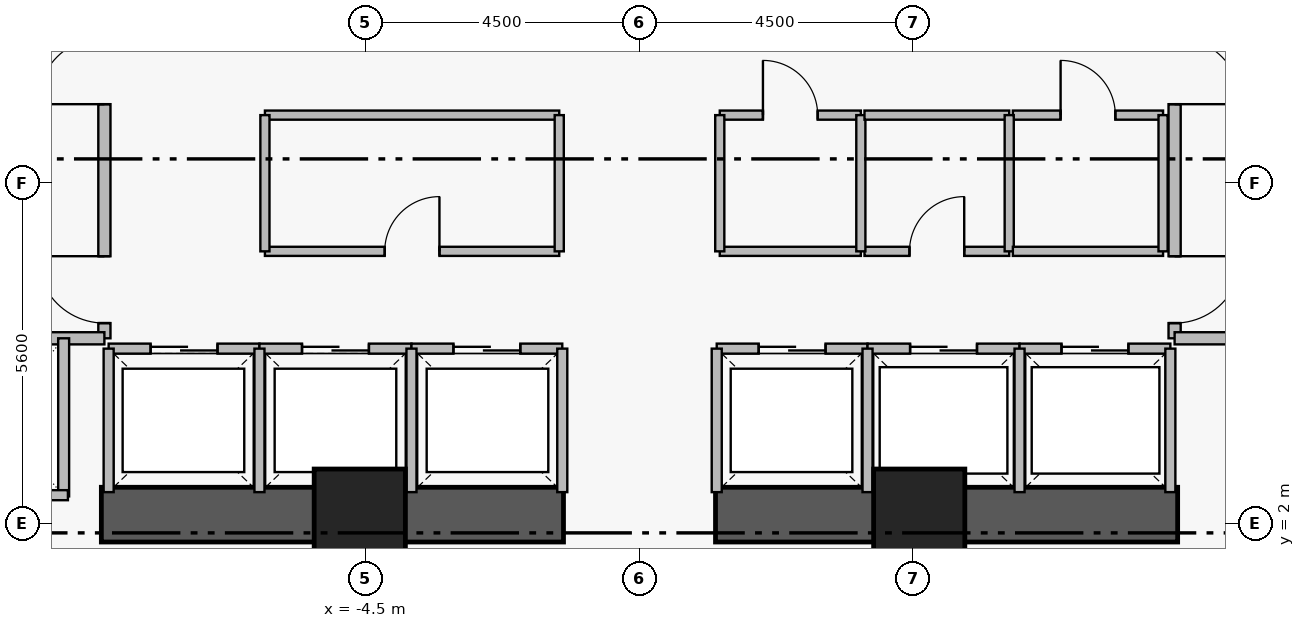
"""IFC4 building model, lengths in metres.
Left out: names, types, materials, properties, quantities, classifications, styles, units other than length and angle.
Written with IfcOpenShell. Run it as: python <this file> out.ifc"""

import sys

from ifc_helpers import new_model, si_unit, direction, frame, frame_2d, origin, origin_2d, place, context, subcontext, project, spatial, rectangle, extrude, element, fill, save


model = new_model("IFC4")
c1 = context("Model", 3, precision=1e-05, world=origin(), true_north=direction((0.0, 1.0)))
c2 = subcontext(c1, "Body", "Model", "MODEL_VIEW")
j1 = project(units=[si_unit("LENGTHUNIT", "METRE"), si_unit("PLANEANGLEUNIT", "RADIAN")], contexts=[c1])
p1 = place(None, origin())
s1 = spatial("IfcSite", under=j1, at=p1, CompositionType="ELEMENT")
p2 = place(p1, origin())
s2 = spatial("IfcBuilding", under=s1, at=p2, CompositionType="ELEMENT")
p3 = place(p2, origin())
s3 = spatial("IfcBuildingStorey", under=s2, at=p3, CompositionType="ELEMENT", Elevation=0.0)
for number, where, z_axis, x_axis in (
    (1, (-8.85, 2.15, 0.0), (0.0, 0.0, 1.0), (1.0, 0.0, 0.0)),
    (2, (1.25, 2.15, 0.0), (0.0, 0.0, 1.0), (1.0, 0.0, 0.0)),
):
    element("IfcWall", number, at=place(p3, frame(where, z_axis=z_axis, x_axis=x_axis)), inside=s3, PredefinedType="SHEAR", context=c2, shape_type="SweptSolid", body=[
        extrude(rectangle(XDim=7.6, YDim=0.9, at=frame_2d((3.8, 0.0))), origin(), (0.0, 0.0, 1.0), 5.75),
    ])
for number, where, z_axis, x_axis in (
    (3, (-4.6, 2.15, 0.0), (0.0, 0.0, 1.0), (1.0, 0.0, 0.0)),
    (4, (4.6, 2.15, 0.0), (0.0, 0.0, 1.0), (1.0, 0.0, 0.0)),
):
    element("IfcColumn", number, at=place(p3, frame(where, z_axis=z_axis, x_axis=x_axis)), inside=s3, PredefinedType="COLUMN", context=c2, shape_type="SweptSolid", body=[
        extrude(rectangle(XDim=1.5, YDim=1.5, at=origin_2d()), origin(), (0.0, 0.0, 1.0), 6.0),
    ])
p4 = place(p3, frame((-8.8, 5.05, 0.0), z_axis=(0.0, 0.0, 1.0), x_axis=(0.0, 1.0, 0.0)))
e5 = element("IfcWall", 5, at=p4, inside=s3, PredefinedType="PARTITIONING", context=c2, shape_type="SweptSolid", body=[
    extrude(rectangle(XDim=6.1, YDim=0.2, at=frame_2d((3.05, 0.0))), origin(), (0.0, 0.0, 1.0), 5.75),
])
p5 = place(p4, frame((0.25, 0.0, 0.0)))
e6 = element("IfcOpeningElement", 6, at=p5, cuts=e5, PredefinedType="OPENING", context=c2, shape_type="SweptSolid", body=[
    extrude(rectangle(XDim=1.1, YDim=2.2, at=frame_2d((0.55, 1.1))), frame((0.0, 0.11, 0.0), z_axis=(0.0, -1.0, 0.0), x_axis=(1.0, 0.0, 0.0)), (0.0, 0.0, 1.0), 0.22),
])
p6 = place(p4, frame((3.85, 0.0, 0.0)))
e7 = element("IfcOpeningElement", 7, at=p6, cuts=e5, PredefinedType="OPENING", context=c2, shape_type="SweptSolid", body=[
    extrude(rectangle(XDim=1.1, YDim=2.2, at=frame_2d((0.55, 1.1))), frame((0.0, 0.11, 0.0), z_axis=(0.0, -1.0, 0.0), x_axis=(1.0, 0.0, 0.0)), (0.0, 0.0, 1.0), 0.22),
])
p7 = place(p3, frame((8.8, 11.15, 0.0), z_axis=(0.0, 0.0, 1.0), x_axis=(0.0, -1.0, 0.0)))
e8 = element("IfcWall", 8, at=p7, inside=s3, PredefinedType="PARTITIONING", context=c2, shape_type="SweptSolid", body=[
    extrude(rectangle(XDim=6.1, YDim=0.2, at=frame_2d((3.05, 0.0))), origin(), (0.0, 0.0, 1.0), 5.75),
])
p8 = place(p7, frame((1.15, 0.0, 0.0)))
e9 = element("IfcOpeningElement", 9, at=p8, cuts=e8, PredefinedType="OPENING", context=c2, shape_type="SweptSolid", body=[
    extrude(rectangle(XDim=1.1, YDim=2.2, at=frame_2d((0.55, 1.1))), frame((0.0, 0.11, 0.0), z_axis=(0.0, -1.0, 0.0), x_axis=(1.0, 0.0, 0.0)), (0.0, 0.0, 1.0), 0.22),
])
p9 = place(p7, frame((4.75, 0.0, 0.0)))
e10 = element("IfcOpeningElement", 10, at=p9, cuts=e8, PredefinedType="OPENING", context=c2, shape_type="SweptSolid", body=[
    extrude(rectangle(XDim=1.1, YDim=2.2, at=frame_2d((0.55, 1.1))), frame((0.0, 0.11, 0.0), z_axis=(0.0, -1.0, 0.0), x_axis=(1.0, 0.0, 0.0)), (0.0, 0.0, 1.0), 0.22),
])
p10 = place(p3, frame((-8.73, 4.88, 0.0), z_axis=(0.0, 0.0, 1.0), x_axis=(1.0, 0.0, 0.0)))
e11 = element("IfcWall", 11, at=p10, inside=s3, PredefinedType="PARTITIONING", context=c2, shape_type="SweptSolid", body=[
    extrude(rectangle(XDim=2.48, YDim=0.165, at=frame_2d((1.24, 0.0))), origin(), (0.0, 0.0, 1.0), 5.75),
])
p11 = place(p10, frame((0.69, 0.0, 0.0)))
e12 = element("IfcOpeningElement", 12, at=p11, cuts=e11, PredefinedType="OPENING", context=c2, shape_type="SweptSolid", body=[
    extrude(rectangle(XDim=1.1, YDim=2.25, at=frame_2d((0.55, 1.125))), frame((0.0, 0.093, 0.0), z_axis=(0.0, -1.0, 0.0), x_axis=(1.0, 0.0, 0.0)), (0.0, 0.0, 1.0), 0.185),
])
p12 = place(p3, frame((-6.25, 4.88, 0.0), z_axis=(0.0, 0.0, 1.0), x_axis=(1.0, 0.0, 0.0)))
e13 = element("IfcWall", 13, at=p12, inside=s3, PredefinedType="PARTITIONING", context=c2, shape_type="SweptSolid", body=[
    extrude(rectangle(XDim=2.5, YDim=0.165, at=frame_2d((1.25, 0.0))), origin(), (0.0, 0.0, 1.0), 5.75),
])
p13 = place(p12, frame((0.7, 0.0, 0.0)))
e14 = element("IfcOpeningElement", 14, at=p13, cuts=e13, PredefinedType="OPENING", context=c2, shape_type="SweptSolid", body=[
    extrude(rectangle(XDim=1.1, YDim=2.25, at=frame_2d((0.55, 1.125))), frame((0.0, 0.093, 0.0), z_axis=(0.0, -1.0, 0.0), x_axis=(1.0, 0.0, 0.0)), (0.0, 0.0, 1.0), 0.185),
])
p14 = place(p3, frame((-3.75, 4.88, 0.0), z_axis=(0.0, 0.0, 1.0), x_axis=(1.0, 0.0, 0.0)))
e15 = element("IfcWall", 15, at=p14, inside=s3, PredefinedType="PARTITIONING", context=c2, shape_type="SweptSolid", body=[
    extrude(rectangle(XDim=2.48, YDim=0.165, at=frame_2d((1.24, 0.0))), origin(), (0.0, 0.0, 1.0), 5.75),
])
p15 = place(p14, frame((0.69, 0.0, 0.0)))
e16 = element("IfcOpeningElement", 16, at=p15, cuts=e15, PredefinedType="OPENING", context=c2, shape_type="SweptSolid", body=[
    extrude(rectangle(XDim=1.1, YDim=2.25, at=frame_2d((0.55, 1.125))), frame((0.0, 0.093, 0.0), z_axis=(0.0, -1.0, 0.0), x_axis=(1.0, 0.0, 0.0)), (0.0, 0.0, 1.0), 0.185),
])
p16 = place(p3, frame((1.27, 4.88, 0.0), z_axis=(0.0, 0.0, 1.0), x_axis=(1.0, 0.0, 0.0)))
e17 = element("IfcWall", 17, at=p16, inside=s3, PredefinedType="PARTITIONING", context=c2, shape_type="SweptSolid", body=[
    extrude(rectangle(XDim=2.48, YDim=0.165, at=frame_2d((1.24, 0.0))), origin(), (0.0, 0.0, 1.0), 5.75),
])
p17 = place(p16, frame((0.69, 0.0, 0.0)))
e18 = element("IfcOpeningElement", 18, at=p17, cuts=e17, PredefinedType="OPENING", context=c2, shape_type="SweptSolid", body=[
    extrude(rectangle(XDim=1.1, YDim=2.25, at=frame_2d((0.55, 1.125))), frame((0.0, 0.093, 0.0), z_axis=(0.0, -1.0, 0.0), x_axis=(1.0, 0.0, 0.0)), (0.0, 0.0, 1.0), 0.185),
])
p18 = place(p3, frame((3.75, 4.88, 0.0), z_axis=(0.0, 0.0, 1.0), x_axis=(1.0, 0.0, 0.0)))
e19 = element("IfcWall", 19, at=p18, inside=s3, PredefinedType="PARTITIONING", context=c2, shape_type="SweptSolid", body=[
    extrude(rectangle(XDim=2.5, YDim=0.165, at=frame_2d((1.25, 0.0))), origin(), (0.0, 0.0, 1.0), 5.75),
])
p19 = place(p18, frame((0.7, 0.0, 0.0)))
e20 = element("IfcOpeningElement", 20, at=p19, cuts=e19, PredefinedType="OPENING", context=c2, shape_type="SweptSolid", body=[
    extrude(rectangle(XDim=1.1, YDim=2.25, at=frame_2d((0.55, 1.125))), frame((0.0, 0.093, 0.0), z_axis=(0.0, -1.0, 0.0), x_axis=(1.0, 0.0, 0.0)), (0.0, 0.0, 1.0), 0.185),
])
p20 = place(p3, frame((6.25, 4.88, 0.0), z_axis=(0.0, 0.0, 1.0), x_axis=(1.0, 0.0, 0.0)))
e21 = element("IfcWall", 21, at=p20, inside=s3, PredefinedType="PARTITIONING", context=c2, shape_type="SweptSolid", body=[
    extrude(rectangle(XDim=2.48, YDim=0.165, at=frame_2d((1.24, 0.0))), origin(), (0.0, 0.0, 1.0), 5.75),
])
p21 = place(p20, frame((0.69, 0.0, 0.0)))
e22 = element("IfcOpeningElement", 22, at=p21, cuts=e21, PredefinedType="OPENING", context=c2, shape_type="SweptSolid", body=[
    extrude(rectangle(XDim=1.1, YDim=2.25, at=frame_2d((0.55, 1.125))), frame((0.0, 0.093, 0.0), z_axis=(0.0, -1.0, 0.0), x_axis=(1.0, 0.0, 0.0)), (0.0, 0.0, 1.0), 0.185),
])
p22 = place(p3, frame((-6.16, 6.48, 0.0), z_axis=(0.0, 0.0, 1.0), x_axis=(1.0, 0.0, 0.0)))
e23 = element("IfcWall", 23, at=p22, inside=s3, PredefinedType="PARTITIONING", context=c2, shape_type="SweptSolid", body=[
    extrude(rectangle(XDim=4.84, YDim=0.15, at=frame_2d((2.42, 0.0))), origin(), (0.0, 0.0, 1.0), 5.75),
])
p23 = place(p22, frame((1.97, 0.0, 0.0)))
e24 = element("IfcOpeningElement", 24, at=p23, cuts=e23, PredefinedType="OPENING", context=c2, shape_type="SweptSolid", body=[
    extrude(rectangle(XDim=0.9, YDim=2.15, at=frame_2d((0.45, 1.075))), frame((0.0, 0.085, 0.0), z_axis=(0.0, -1.0, 0.0), x_axis=(1.0, 0.0, 0.0)), (0.0, 0.0, 1.0), 0.17),
])
p24 = place(p3, frame((1.32, 8.72, 0.0), z_axis=(0.0, 0.0, 1.0), x_axis=(1.0, 0.0, 0.0)))
e25 = element("IfcWall", 25, at=p24, inside=s3, PredefinedType="PARTITIONING", context=c2, shape_type="SweptSolid", body=[
    extrude(rectangle(XDim=2.32, YDim=0.15, at=frame_2d((1.16, 0.0))), origin(), (0.0, 0.0, 1.0), 5.75),
])
p25 = place(p24, frame((0.71, 0.0, 0.0)))
e26 = element("IfcOpeningElement", 26, at=p25, cuts=e25, PredefinedType="OPENING", context=c2, shape_type="SweptSolid", body=[
    extrude(rectangle(XDim=0.9, YDim=2.15, at=frame_2d((0.45, 1.075))), frame((0.0, 0.085, 0.0), z_axis=(0.0, -1.0, 0.0), x_axis=(1.0, 0.0, 0.0)), (0.0, 0.0, 1.0), 0.17),
])
p26 = place(p3, frame((3.7, 6.48, 0.0), z_axis=(0.0, 0.0, 1.0), x_axis=(1.0, 0.0, 0.0)))
e27 = element("IfcWall", 27, at=p26, inside=s3, PredefinedType="PARTITIONING", context=c2, shape_type="SweptSolid", body=[
    extrude(rectangle(XDim=2.38, YDim=0.15, at=frame_2d((1.19, 0.0))), origin(), (0.0, 0.0, 1.0), 5.75),
])
p27 = place(p26, frame((0.74, 0.0, 0.0)))
e28 = element("IfcOpeningElement", 28, at=p27, cuts=e27, PredefinedType="OPENING", context=c2, shape_type="SweptSolid", body=[
    extrude(rectangle(XDim=0.9, YDim=2.15, at=frame_2d((0.45, 1.075))), frame((0.0, 0.085, 0.0), z_axis=(0.0, -1.0, 0.0), x_axis=(1.0, 0.0, 0.0)), (0.0, 0.0, 1.0), 0.17),
])
p28 = place(p3, frame((6.14, 8.72, 0.0), z_axis=(0.0, 0.0, 1.0), x_axis=(1.0, 0.0, 0.0)))
e29 = element("IfcWall", 29, at=p28, inside=s3, PredefinedType="PARTITIONING", context=c2, shape_type="SweptSolid", body=[
    extrude(rectangle(XDim=2.47, YDim=0.15, at=frame_2d((1.235, 0.0))), origin(), (0.0, 0.0, 1.0), 5.75),
])
p29 = place(p28, frame((0.785, 0.0, 0.0)))
e30 = element("IfcOpeningElement", 30, at=p29, cuts=e29, PredefinedType="OPENING", context=c2, shape_type="SweptSolid", body=[
    extrude(rectangle(XDim=0.9, YDim=2.15, at=frame_2d((0.45, 1.075))), frame((0.0, 0.085, 0.0), z_axis=(0.0, -1.0, 0.0), x_axis=(1.0, 0.0, 0.0)), (0.0, 0.0, 1.0), 0.17),
])
for number, where, z_axis, x_axis in (
    (31, (-11.65, 5.05, 0.0), (0.0, 0.0, 1.0), (1.0, 0.0, 0.0)),
    (32, (8.8, 5.05, 0.0), (0.0, 0.0, 1.0), (1.0, 0.0, 0.0)),
):
    element("IfcWall", number, at=place(p3, frame(where, z_axis=z_axis, x_axis=x_axis)), inside=s3, PredefinedType="PARTITIONING", context=c2, shape_type="SweptSolid", body=[
        extrude(rectangle(XDim=2.85, YDim=0.2, at=frame_2d((1.425, 0.0))), origin(), (0.0, 0.0, 1.0), 5.75),
    ])
for number, where, z_axis, x_axis in (
    (33, (-8.73, 2.52, 0.0), (0.0, 0.0, 1.0), (0.0, 1.0, 0.0)),
    (34, (-6.25, 2.52, 0.0), (0.0, 0.0, 1.0), (0.0, 1.0, 0.0)),
    (35, (-3.75, 2.52, 0.0), (0.0, 0.0, 1.0), (0.0, 1.0, 0.0)),
    (36, (-1.27, 2.52, 0.0), (0.0, 0.0, 1.0), (0.0, 1.0, 0.0)),
    (37, (1.27, 2.52, 0.0), (0.0, 0.0, 1.0), (0.0, 1.0, 0.0)),
    (38, (3.75, 2.52, 0.0), (0.0, 0.0, 1.0), (0.0, 1.0, 0.0)),
    (39, (6.25, 2.52, 0.0), (0.0, 0.0, 1.0), (0.0, 1.0, 0.0)),
    (40, (8.73, 2.52, 0.0), (0.0, 0.0, 1.0), (0.0, 1.0, 0.0)),
):
    element("IfcWall", number, at=place(p3, frame(where, z_axis=z_axis, x_axis=x_axis)), inside=s3, PredefinedType="PARTITIONING", context=c2, shape_type="SweptSolid", body=[
        extrude(rectangle(XDim=2.36, YDim=0.165, at=frame_2d((1.18, 0.0))), origin(), (0.0, 0.0, 1.0), 5.75),
    ])
p30 = place(p3, frame((-9.47, 2.45, 0.0), z_axis=(0.0, 0.0, 1.0), x_axis=(0.0, 1.0, 0.0)))
e41 = element("IfcWall", 41, at=p30, inside=s3, PredefinedType="PARTITIONING", context=c2, shape_type="SweptSolid", body=[
    extrude(rectangle(XDim=2.6, YDim=0.18, at=frame_2d((1.3, 0.0))), origin(), (0.0, 0.0, 1.0), 5.75),
])
p31 = place(p3, frame((-11.71, 2.47, 0.0), z_axis=(0.0, 0.0, 1.0), x_axis=(1.0, 0.0, 0.0)))
e42 = element("IfcWall", 42, at=p31, inside=s3, PredefinedType="PARTITIONING", context=c2, shape_type="SweptSolid", body=[
    extrude(rectangle(XDim=2.31, YDim=0.165, at=frame_2d((1.155, 0.0))), origin(), (0.0, 0.0, 1.0), 4.35),
])
p32 = place(p3, frame((-6.16, 8.72, 0.0), z_axis=(0.0, 0.0, 1.0), x_axis=(1.0, 0.0, 0.0)))
e43 = element("IfcWall", 43, at=p32, inside=s3, PredefinedType="PARTITIONING", context=c2, shape_type="SweptSolid", body=[
    extrude(rectangle(XDim=4.84, YDim=0.15, at=frame_2d((2.42, 0.0))), origin(), (0.0, 0.0, 1.0), 5.75),
])
for number, where, z_axis, x_axis in (
    (44, (-6.16, 6.48, 0.0), (0.0, 0.0, 1.0), (0.0, 1.0, 0.0)),
    (45, (-1.32, 6.48, 0.0), (0.0, 0.0, 1.0), (0.0, 1.0, 0.0)),
):
    element("IfcWall", number, at=place(p3, frame(where, z_axis=z_axis, x_axis=x_axis)), inside=s3, PredefinedType="PARTITIONING", context=c2, shape_type="SweptSolid", body=[
        extrude(rectangle(XDim=2.24, YDim=0.15, at=frame_2d((1.12, 0.0))), origin(), (0.0, 0.0, 1.0), 5.75),
    ])
p33 = place(p3, frame((1.32, 6.48, 0.0), z_axis=(0.0, 0.0, 1.0), x_axis=(1.0, 0.0, 0.0)))
e46 = element("IfcWall", 46, at=p33, inside=s3, PredefinedType="PARTITIONING", context=c2, shape_type="SweptSolid", body=[
    extrude(rectangle(XDim=2.32, YDim=0.15, at=frame_2d((1.16, 0.0))), origin(), (0.0, 0.0, 1.0), 5.75),
])
for number, where, z_axis, x_axis in (
    (47, (1.32, 6.48, 0.0), (0.0, 0.0, 1.0), (0.0, 1.0, 0.0)),
    (48, (3.64, 6.48, 0.0), (0.0, 0.0, 1.0), (0.0, 1.0, 0.0)),
):
    element("IfcWall", number, at=place(p3, frame(where, z_axis=z_axis, x_axis=x_axis)), inside=s3, PredefinedType="PARTITIONING", context=c2, shape_type="SweptSolid", body=[
        extrude(rectangle(XDim=2.24, YDim=0.15, at=frame_2d((1.12, 0.0))), origin(), (0.0, 0.0, 1.0), 5.75),
    ])
p34 = place(p3, frame((3.7, 8.72, 0.0), z_axis=(0.0, 0.0, 1.0), x_axis=(1.0, 0.0, 0.0)))
e49 = element("IfcWall", 49, at=p34, inside=s3, PredefinedType="PARTITIONING", context=c2, shape_type="SweptSolid", body=[
    extrude(rectangle(XDim=2.38, YDim=0.15, at=frame_2d((1.19, 0.0))), origin(), (0.0, 0.0, 1.0), 5.75),
])
p35 = place(p3, frame((6.08, 6.48, 0.0), z_axis=(0.0, 0.0, 1.0), x_axis=(0.0, 1.0, 0.0)))
e50 = element("IfcWall", 50, at=p35, inside=s3, PredefinedType="PARTITIONING", context=c2, shape_type="SweptSolid", body=[
    extrude(rectangle(XDim=2.24, YDim=0.15, at=frame_2d((1.12, 0.0))), origin(), (0.0, 0.0, 1.0), 5.75),
])
p36 = place(p3, frame((6.14, 6.48, 0.0), z_axis=(0.0, 0.0, 1.0), x_axis=(1.0, 0.0, 0.0)))
e51 = element("IfcWall", 51, at=p36, inside=s3, PredefinedType="PARTITIONING", context=c2, shape_type="SweptSolid", body=[
    extrude(rectangle(XDim=2.47, YDim=0.15, at=frame_2d((1.235, 0.0))), origin(), (0.0, 0.0, 1.0), 5.75),
])
p37 = place(p3, frame((8.61, 6.48, 0.0), z_axis=(0.0, 0.0, 1.0), x_axis=(0.0, 1.0, 0.0)))
e52 = element("IfcWall", 52, at=p37, inside=s3, PredefinedType="PARTITIONING", context=c2, shape_type="SweptSolid", body=[
    extrude(rectangle(XDim=2.24, YDim=0.15, at=frame_2d((1.12, 0.0))), origin(), (0.0, 0.0, 1.0), 5.75),
])
p38 = place(p5, origin())
e53 = element("IfcDoor", 53, at=p38, inside=s3, OperationType="SINGLE_SWING_RIGHT", PredefinedType="DOOR", context=c2, shape_type="SweptSolid", body=[
    extrude(rectangle(XDim=1.1, YDim=2.2, at=frame_2d((0.55, 1.1))), frame((0.0, 0.025, 0.0), z_axis=(0.0, -1.0, 0.0), x_axis=(1.0, 0.0, 0.0)), (0.0, 0.0, 1.0), 0.05),
])
fill(e6, e53)
p39 = place(p6, origin())
e54 = element("IfcDoor", 54, at=p39, inside=s3, OperationType="SINGLE_SWING_LEFT", PredefinedType="DOOR", context=c2, shape_type="SweptSolid", body=[
    extrude(rectangle(XDim=1.1, YDim=2.2, at=frame_2d((0.55, 1.1))), frame((0.0, 0.025, 0.0), z_axis=(0.0, -1.0, 0.0), x_axis=(1.0, 0.0, 0.0)), (0.0, 0.0, 1.0), 0.05),
])
fill(e7, e54)
p40 = place(p8, origin())
e55 = element("IfcDoor", 55, at=p40, inside=s3, OperationType="SINGLE_SWING_RIGHT", PredefinedType="DOOR", context=c2, shape_type="SweptSolid", body=[
    extrude(rectangle(XDim=1.1, YDim=2.2, at=frame_2d((0.55, 1.1))), frame((0.0, 0.025, 0.0), z_axis=(0.0, -1.0, 0.0), x_axis=(1.0, 0.0, 0.0)), (0.0, 0.0, 1.0), 0.05),
])
fill(e9, e55)
p41 = place(p9, origin())
e56 = element("IfcDoor", 56, at=p41, inside=s3, OperationType="SINGLE_SWING_LEFT", PredefinedType="DOOR", context=c2, shape_type="SweptSolid", body=[
    extrude(rectangle(XDim=1.1, YDim=2.2, at=frame_2d((0.55, 1.1))), frame((0.0, 0.025, 0.0), z_axis=(0.0, -1.0, 0.0), x_axis=(1.0, 0.0, 0.0)), (0.0, 0.0, 1.0), 0.05),
])
fill(e10, e56)
p42 = place(p11, origin())
e57 = element("IfcDoor", 57, at=p42, inside=s3, OperationType="SLIDING_TO_LEFT", PredefinedType="DOOR", context=c2, shape_type="SweptSolid", body=[
    extrude(rectangle(XDim=1.1, YDim=2.25, at=frame_2d((0.55, 1.125))), frame((0.0, 0.025, 0.0), z_axis=(0.0, -1.0, 0.0), x_axis=(1.0, 0.0, 0.0)), (0.0, 0.0, 1.0), 0.05),
])
fill(e12, e57)
p43 = place(p13, origin())
e58 = element("IfcDoor", 58, at=p43, inside=s3, OperationType="SLIDING_TO_LEFT", PredefinedType="DOOR", context=c2, shape_type="SweptSolid", body=[
    extrude(rectangle(XDim=1.1, YDim=2.25, at=frame_2d((0.55, 1.125))), frame((0.0, 0.025, 0.0), z_axis=(0.0, -1.0, 0.0), x_axis=(1.0, 0.0, 0.0)), (0.0, 0.0, 1.0), 0.05),
])
fill(e14, e58)
p44 = place(p15, origin())
e59 = element("IfcDoor", 59, at=p44, inside=s3, OperationType="SLIDING_TO_LEFT", PredefinedType="DOOR", context=c2, shape_type="SweptSolid", body=[
    extrude(rectangle(XDim=1.1, YDim=2.25, at=frame_2d((0.55, 1.125))), frame((0.0, 0.025, 0.0), z_axis=(0.0, -1.0, 0.0), x_axis=(1.0, 0.0, 0.0)), (0.0, 0.0, 1.0), 0.05),
])
fill(e16, e59)
p45 = place(p17, origin())
e60 = element("IfcDoor", 60, at=p45, inside=s3, OperationType="SLIDING_TO_LEFT", PredefinedType="DOOR", context=c2, shape_type="SweptSolid", body=[
    extrude(rectangle(XDim=1.1, YDim=2.25, at=frame_2d((0.55, 1.125))), frame((0.0, 0.025, 0.0), z_axis=(0.0, -1.0, 0.0), x_axis=(1.0, 0.0, 0.0)), (0.0, 0.0, 1.0), 0.05),
])
fill(e18, e60)
p46 = place(p19, origin())
e61 = element("IfcDoor", 61, at=p46, inside=s3, OperationType="SLIDING_TO_LEFT", PredefinedType="DOOR", context=c2, shape_type="SweptSolid", body=[
    extrude(rectangle(XDim=1.1, YDim=2.25, at=frame_2d((0.55, 1.125))), frame((0.0, 0.025, 0.0), z_axis=(0.0, -1.0, 0.0), x_axis=(1.0, 0.0, 0.0)), (0.0, 0.0, 1.0), 0.05),
])
fill(e20, e61)
p47 = place(p21, origin())
e62 = element("IfcDoor", 62, at=p47, inside=s3, OperationType="SLIDING_TO_LEFT", PredefinedType="DOOR", context=c2, shape_type="SweptSolid", body=[
    extrude(rectangle(XDim=1.1, YDim=2.25, at=frame_2d((0.55, 1.125))), frame((0.0, 0.025, 0.0), z_axis=(0.0, -1.0, 0.0), x_axis=(1.0, 0.0, 0.0)), (0.0, 0.0, 1.0), 0.05),
])
fill(e22, e62)
p48 = place(p23, origin())
e63 = element("IfcDoor", 63, at=p48, inside=s3, OperationType="SINGLE_SWING_RIGHT", PredefinedType="DOOR", context=c2, shape_type="SweptSolid", body=[
    extrude(rectangle(XDim=0.9, YDim=2.15, at=frame_2d((0.45, 1.075))), frame((0.0, 0.025, 0.0), z_axis=(0.0, -1.0, 0.0), x_axis=(1.0, 0.0, 0.0)), (0.0, 0.0, 1.0), 0.05),
])
fill(e24, e63)
p49 = place(p25, origin())
e64 = element("IfcDoor", 64, at=p49, inside=s3, OperationType="SINGLE_SWING_LEFT", PredefinedType="DOOR", context=c2, shape_type="SweptSolid", body=[
    extrude(rectangle(XDim=0.9, YDim=2.15, at=frame_2d((0.45, 1.075))), frame((0.0, 0.025, 0.0), z_axis=(0.0, -1.0, 0.0), x_axis=(1.0, 0.0, 0.0)), (0.0, 0.0, 1.0), 0.05),
])
fill(e26, e64)
p50 = place(p27, origin())
e65 = element("IfcDoor", 65, at=p50, inside=s3, OperationType="SINGLE_SWING_RIGHT", PredefinedType="DOOR", context=c2, shape_type="SweptSolid", body=[
    extrude(rectangle(XDim=0.9, YDim=2.15, at=frame_2d((0.45, 1.075))), frame((0.0, 0.025, 0.0), z_axis=(0.0, -1.0, 0.0), x_axis=(1.0, 0.0, 0.0)), (0.0, 0.0, 1.0), 0.05),
])
fill(e28, e65)
p51 = place(p29, origin())
e66 = element("IfcDoor", 66, at=p51, inside=s3, OperationType="SINGLE_SWING_LEFT", PredefinedType="DOOR", context=c2, shape_type="SweptSolid", body=[
    extrude(rectangle(XDim=0.9, YDim=2.15, at=frame_2d((0.45, 1.075))), frame((0.0, 0.025, 0.0), z_axis=(0.0, -1.0, 0.0), x_axis=(1.0, 0.0, 0.0)), (0.0, 0.0, 1.0), 0.05),
])
fill(e30, e66)
save(model, sys.argv[1])
